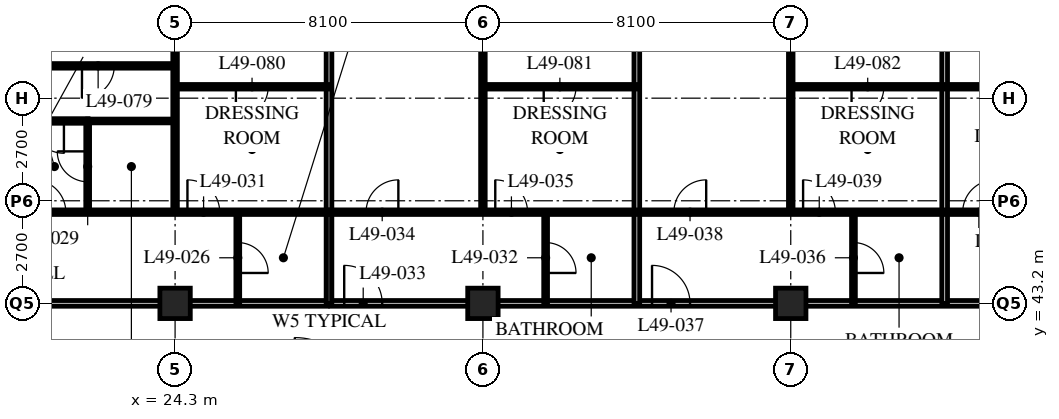
"""IFC4 building model, lengths in metres.
Left out: names, types, materials, properties, quantities, classifications, styles, units other than length and angle.
Written with IfcOpenShell. Run it as: python <this file> out.ifc"""

import sys

from ifc_helpers import new_model, si_unit, direction, frame, frame_2d, origin, origin_2d, place, context, subcontext, project, spatial, rectangle, hollow_rectangle, extrude, element, fill, save


model = new_model("IFC4")
c1 = context("Model", 3, precision=1e-05, world=origin(), true_north=direction((0.0, 1.0)))
c2 = subcontext(c1, "Body", "Model", "MODEL_VIEW")
j1 = project(units=[si_unit("LENGTHUNIT", "METRE"), si_unit("PLANEANGLEUNIT", "RADIAN")], contexts=[c1])
p1 = place(None, origin())
s1 = spatial("IfcSite", under=j1, at=p1, CompositionType="ELEMENT")
p2 = place(p1, origin())
s2 = spatial("IfcBuilding", under=s1, at=p2, CompositionType="ELEMENT")
p3 = place(p2, frame((0.0, 0.0, 192.0)))
s3 = spatial("IfcBuildingStorey", under=s2, at=p3, CompositionType="ELEMENT", Elevation=192.0)
for number, where, z_axis, x_axis in (
    (1, (24.3, 43.2, 0.0), (0.0, 0.0, 1.0), (1.0, 0.0, 0.0)),
    (2, (32.4, 43.2, 0.0), (0.0, 0.0, 1.0), (1.0, 0.0, 0.0)),
    (3, (40.5, 43.2, 0.0), (0.0, 0.0, 1.0), (1.0, 0.0, 0.0)),
):
    element("IfcColumn", number, at=place(p3, frame(where, z_axis=z_axis, x_axis=x_axis)), inside=s3, PredefinedType="COLUMN", context=c2, shape_type="SweptSolid", body=[
        extrude(hollow_rectangle(XDim=0.8, YDim=0.8, WallThickness=0.08, at=origin_2d()), origin(), (0.0, 0.0, 1.0), 3.6),
    ])
p4 = place(p3, frame((8.1, 43.2, 0.0), z_axis=(0.0, 0.0, 1.0), x_axis=(1.0, 0.0, 0.0)))
e4 = element("IfcWall", 4, at=p4, inside=s3, PredefinedType="PARTITIONING", context=c2, shape_type="SweptSolid", body=[
    extrude(rectangle(XDim=40.5, YDim=0.15, at=frame_2d((20.25, 0.0))), origin(), (0.0, 0.0, 1.0), 2.778),
])
p5 = place(p4, frame((4.45, 0.0, 0.0)))
e5 = element("IfcOpeningElement", 5, at=p5, cuts=e4, PredefinedType="OPENING", context=c2, shape_type="SweptSolid", body=[
    extrude(rectangle(XDim=1.0, YDim=2.1, at=frame_2d((0.5, 1.05))), frame((0.0, 0.085, 0.0), z_axis=(0.0, -1.0, 0.0), x_axis=(1.0, 0.0, 0.0)), (0.0, 0.0, 1.0), 0.17),
])
p6 = place(p4, frame((20.65, 0.0, 0.0)))
e6 = element("IfcOpeningElement", 6, at=p6, cuts=e4, PredefinedType="OPENING", context=c2, shape_type="SweptSolid", body=[
    extrude(rectangle(XDim=1.0, YDim=2.1, at=frame_2d((0.5, 1.05))), frame((0.0, 0.085, 0.0), z_axis=(0.0, -1.0, 0.0), x_axis=(1.0, 0.0, 0.0)), (0.0, 0.0, 1.0), 0.17),
])
p7 = place(p4, frame((28.75, 0.0, 0.0)))
e7 = element("IfcOpeningElement", 7, at=p7, cuts=e4, PredefinedType="OPENING", context=c2, shape_type="SweptSolid", body=[
    extrude(rectangle(XDim=1.0, YDim=2.1, at=frame_2d((0.5, 1.05))), frame((0.0, 0.085, 0.0), z_axis=(0.0, -1.0, 0.0), x_axis=(1.0, 0.0, 0.0)), (0.0, 0.0, 1.0), 0.17),
])
p8 = place(p4, frame((37.975, 0.0, 0.0)))
e8 = element("IfcOpeningElement", 8, at=p8, cuts=e4, PredefinedType="OPENING", context=c2, shape_type="SweptSolid", body=[
    extrude(rectangle(XDim=1.0, YDim=2.1, at=frame_2d((0.5, 1.05))), frame((0.0, 0.085, 0.0), z_axis=(0.0, -1.0, 0.0), x_axis=(1.0, 0.0, 0.0)), (0.0, 0.0, 1.0), 0.17),
])
p9 = place(p4, frame((1.525, 0.0, 0.0)))
e9 = element("IfcOpeningElement", 9, at=p9, cuts=e4, PredefinedType="OPENING", context=c2, shape_type="SweptSolid", body=[
    extrude(rectangle(XDim=1.0, YDim=2.1, at=frame_2d((0.5, 1.05))), frame((0.0, 0.085, 0.0), z_axis=(0.0, -1.0, 0.0), x_axis=(1.0, 0.0, 0.0)), (0.0, 0.0, 1.0), 0.17),
])
p10 = place(p3, frame((25.95, 43.2, 0.0), z_axis=(0.0, 0.0, 1.0), x_axis=(0.0, 1.0, 0.0)))
e10 = element("IfcWall", 10, at=p10, inside=s3, PredefinedType="PARTITIONING", context=c2, shape_type="SweptSolid", body=[
    extrude(rectangle(XDim=2.4, YDim=0.1, at=frame_2d((1.2, 0.0))), origin(), (0.0, 0.0, 1.0), 3.39),
])
p11 = place(p10, frame((0.8, 0.0, 0.0)))
e11 = element("IfcOpeningElement", 11, at=p11, cuts=e10, PredefinedType="OPENING", context=c2, shape_type="SweptSolid", body=[
    extrude(rectangle(XDim=0.8, YDim=2.1, at=frame_2d((0.4, 1.05))), frame((0.0, 0.06, 0.0), z_axis=(0.0, -1.0, 0.0), x_axis=(1.0, 0.0, 0.0)), (0.0, 0.0, 1.0), 0.12),
])
p12 = place(p3, frame((22.0, 45.6, 0.0), z_axis=(0.0, 0.0, 1.0), x_axis=(0.0, 1.0, 0.0)))
e12 = element("IfcWall", 12, at=p12, inside=s3, PredefinedType="PARTITIONING", context=c2, shape_type="SweptSolid", body=[
    extrude(rectangle(XDim=2.4, YDim=0.1, at=frame_2d((1.2, 0.0))), origin(), (0.0, 0.0, 1.0), 3.39),
])
p13 = place(p12, frame((0.8, 0.0, 0.0)))
e13 = element("IfcOpeningElement", 13, at=p13, cuts=e12, PredefinedType="OPENING", context=c2, shape_type="SweptSolid", body=[
    extrude(rectangle(XDim=0.8, YDim=2.1, at=frame_2d((0.4, 1.05))), frame((0.0, 0.06, 0.0), z_axis=(0.0, -1.0, 0.0), x_axis=(1.0, 0.0, 0.0)), (0.0, 0.0, 1.0), 0.12),
])
p14 = place(p3, frame((22.0, 48.0, 0.0), z_axis=(0.0, 0.0, 1.0), x_axis=(1.0, 0.0, 0.0)))
e14 = element("IfcWall", 14, at=p14, inside=s3, PredefinedType="PARTITIONING", context=c2, shape_type="SweptSolid", body=[
    extrude(rectangle(XDim=2.3, YDim=0.1, at=frame_2d((1.15, 0.0))), origin(), (0.0, 0.0, 1.0), 3.39),
])
p15 = place(p3, frame((24.3, 45.6, 0.0), z_axis=(0.0, 0.0, 1.0), x_axis=(0.0, 1.0, 0.0)))
e15 = element("IfcWall", 15, at=p15, inside=s3, PredefinedType="PARTITIONING", context=c2, shape_type="SweptSolid", body=[
    extrude(rectangle(XDim=13.5, YDim=0.12, at=frame_2d((6.75, 0.0))), origin(), (0.0, 0.0, 1.0), 2.778),
])
p16 = place(p3, frame((28.35, 43.2, 0.0), z_axis=(0.0, 0.0, 1.0), x_axis=(0.0, 1.0, 0.0)))
e16 = element("IfcWall", 16, at=p16, inside=s3, PredefinedType="PARTITIONING", context=c2, shape_type="SweptSolid", body=[
    extrude(rectangle(XDim=15.9, YDim=0.15, at=frame_2d((7.95, 0.0))), origin(), (0.0, 0.0, 1.0), 3.39),
])
p17 = place(p3, frame((34.05, 43.2, 0.0), z_axis=(0.0, 0.0, 1.0), x_axis=(0.0, 1.0, 0.0)))
e17 = element("IfcWall", 17, at=p17, inside=s3, PredefinedType="PARTITIONING", context=c2, shape_type="SweptSolid", body=[
    extrude(rectangle(XDim=2.4, YDim=0.1, at=frame_2d((1.2, 0.0))), origin(), (0.0, 0.0, 1.0), 3.39),
])
p18 = place(p17, frame((0.8, 0.0, 0.0)))
e18 = element("IfcOpeningElement", 18, at=p18, cuts=e17, PredefinedType="OPENING", context=c2, shape_type="SweptSolid", body=[
    extrude(rectangle(XDim=0.8, YDim=2.1, at=frame_2d((0.4, 1.05))), frame((0.0, 0.06, 0.0), z_axis=(0.0, -1.0, 0.0), x_axis=(1.0, 0.0, 0.0)), (0.0, 0.0, 1.0), 0.12),
])
p19 = place(p3, frame((32.4, 45.6, 0.0), z_axis=(0.0, 0.0, 1.0), x_axis=(0.0, 1.0, 0.0)))
e19 = element("IfcWall", 19, at=p19, inside=s3, PredefinedType="PARTITIONING", context=c2, shape_type="SweptSolid", body=[
    extrude(rectangle(XDim=13.5, YDim=0.12, at=frame_2d((6.75, 0.0))), origin(), (0.0, 0.0, 1.0), 2.778),
])
p20 = place(p3, frame((36.45, 43.2, 0.0), z_axis=(0.0, 0.0, 1.0), x_axis=(0.0, 1.0, 0.0)))
e20 = element("IfcWall", 20, at=p20, inside=s3, PredefinedType="PARTITIONING", context=c2, shape_type="SweptSolid", body=[
    extrude(rectangle(XDim=15.9, YDim=0.15, at=frame_2d((7.95, 0.0))), origin(), (0.0, 0.0, 1.0), 3.39),
])
p21 = place(p3, frame((42.15, 43.2, 0.0), z_axis=(0.0, 0.0, 1.0), x_axis=(0.0, 1.0, 0.0)))
e21 = element("IfcWall", 21, at=p21, inside=s3, PredefinedType="PARTITIONING", context=c2, shape_type="SweptSolid", body=[
    extrude(rectangle(XDim=2.4, YDim=0.1, at=frame_2d((1.2, 0.0))), origin(), (0.0, 0.0, 1.0), 3.39),
])
p22 = place(p21, frame((0.8, 0.0, 0.0)))
e22 = element("IfcOpeningElement", 22, at=p22, cuts=e21, PredefinedType="OPENING", context=c2, shape_type="SweptSolid", body=[
    extrude(rectangle(XDim=0.8, YDim=2.1, at=frame_2d((0.4, 1.05))), frame((0.0, 0.06, 0.0), z_axis=(0.0, -1.0, 0.0), x_axis=(1.0, 0.0, 0.0)), (0.0, 0.0, 1.0), 0.12),
])
p23 = place(p3, frame((40.5, 45.6, 0.0), z_axis=(0.0, 0.0, 1.0), x_axis=(0.0, 1.0, 0.0)))
e23 = element("IfcWall", 23, at=p23, inside=s3, PredefinedType="PARTITIONING", context=c2, shape_type="SweptSolid", body=[
    extrude(rectangle(XDim=13.5, YDim=0.12, at=frame_2d((6.75, 0.0))), origin(), (0.0, 0.0, 1.0), 2.778),
])
p24 = place(p3, frame((44.55, 43.2, 0.0), z_axis=(0.0, 0.0, 1.0), x_axis=(0.0, 1.0, 0.0)))
e24 = element("IfcWall", 24, at=p24, inside=s3, PredefinedType="PARTITIONING", context=c2, shape_type="SweptSolid", body=[
    extrude(rectangle(XDim=15.9, YDim=0.15, at=frame_2d((7.95, 0.0))), origin(), (0.0, 0.0, 1.0), 3.39),
])
p25 = place(p3, frame((4.1, 45.6, 0.0), z_axis=(0.0, 0.0, 1.0), x_axis=(1.0, 0.0, 0.0)))
e25 = element("IfcWall", 25, at=p25, inside=s3, PredefinedType="PARTITIONING", context=c2, shape_type="SweptSolid", body=[
    extrude(rectangle(XDim=48.5, YDim=0.12, at=frame_2d((24.25, 0.0))), origin(), (0.0, 0.0, 1.0), 3.39),
])
p26 = place(p25, frame((9.025, 0.0, 0.0)))
e26 = element("IfcOpeningElement", 26, at=p26, cuts=e25, PredefinedType="OPENING", context=c2, shape_type="SweptSolid", body=[
    extrude(rectangle(XDim=0.85, YDim=2.1, at=frame_2d((0.425, 1.05))), frame((0.0, 0.07, 0.0), z_axis=(0.0, -1.0, 0.0), x_axis=(1.0, 0.0, 0.0)), (0.0, 0.0, 1.0), 0.14),
])
p27 = place(p25, frame((16.475, 0.0, 0.0)))
e27 = element("IfcOpeningElement", 27, at=p27, cuts=e25, PredefinedType="OPENING", context=c2, shape_type="SweptSolid", body=[
    extrude(rectangle(XDim=0.85, YDim=2.1, at=frame_2d((0.425, 1.05))), frame((0.0, 0.07, 0.0), z_axis=(0.0, -1.0, 0.0), x_axis=(1.0, 0.0, 0.0)), (0.0, 0.0, 1.0), 0.14),
])
p28 = place(p25, frame((20.525, 0.0, 0.0)))
e28 = element("IfcOpeningElement", 28, at=p28, cuts=e25, PredefinedType="OPENING", context=c2, shape_type="SweptSolid", body=[
    extrude(rectangle(XDim=0.85, YDim=2.1, at=frame_2d((0.425, 1.05))), frame((0.0, 0.07, 0.0), z_axis=(0.0, -1.0, 0.0), x_axis=(1.0, 0.0, 0.0)), (0.0, 0.0, 1.0), 0.14),
])
p29 = place(p25, frame((25.225, 0.0, 0.0)))
e29 = element("IfcOpeningElement", 29, at=p29, cuts=e25, PredefinedType="OPENING", context=c2, shape_type="SweptSolid", body=[
    extrude(rectangle(XDim=0.85, YDim=2.1, at=frame_2d((0.425, 1.05))), frame((0.0, 0.07, 0.0), z_axis=(0.0, -1.0, 0.0), x_axis=(1.0, 0.0, 0.0)), (0.0, 0.0, 1.0), 0.14),
])
p30 = place(p25, frame((28.625, 0.0, 0.0)))
e30 = element("IfcOpeningElement", 30, at=p30, cuts=e25, PredefinedType="OPENING", context=c2, shape_type="SweptSolid", body=[
    extrude(rectangle(XDim=0.85, YDim=2.1, at=frame_2d((0.425, 1.05))), frame((0.0, 0.07, 0.0), z_axis=(0.0, -1.0, 0.0), x_axis=(1.0, 0.0, 0.0)), (0.0, 0.0, 1.0), 0.14),
])
p31 = place(p25, frame((33.325, 0.0, 0.0)))
e31 = element("IfcOpeningElement", 31, at=p31, cuts=e25, PredefinedType="OPENING", context=c2, shape_type="SweptSolid", body=[
    extrude(rectangle(XDim=0.85, YDim=2.1, at=frame_2d((0.425, 1.05))), frame((0.0, 0.07, 0.0), z_axis=(0.0, -1.0, 0.0), x_axis=(1.0, 0.0, 0.0)), (0.0, 0.0, 1.0), 0.14),
])
p32 = place(p25, frame((36.725, 0.0, 0.0)))
e32 = element("IfcOpeningElement", 32, at=p32, cuts=e25, PredefinedType="OPENING", context=c2, shape_type="SweptSolid", body=[
    extrude(rectangle(XDim=0.85, YDim=2.1, at=frame_2d((0.425, 1.05))), frame((0.0, 0.07, 0.0), z_axis=(0.0, -1.0, 0.0), x_axis=(1.0, 0.0, 0.0)), (0.0, 0.0, 1.0), 0.14),
])
p33 = place(p25, frame((40.925, 0.0, 0.0)))
e33 = element("IfcOpeningElement", 33, at=p33, cuts=e25, PredefinedType="OPENING", context=c2, shape_type="SweptSolid", body=[
    extrude(rectangle(XDim=0.85, YDim=2.1, at=frame_2d((0.425, 1.05))), frame((0.0, 0.07, 0.0), z_axis=(0.0, -1.0, 0.0), x_axis=(1.0, 0.0, 0.0)), (0.0, 0.0, 1.0), 0.14),
])
p34 = place(p25, frame((44.775, 0.0, 0.0)))
e34 = element("IfcOpeningElement", 34, at=p34, cuts=e25, PredefinedType="OPENING", context=c2, shape_type="SweptSolid", body=[
    extrude(rectangle(XDim=0.85, YDim=2.1, at=frame_2d((0.425, 1.05))), frame((0.0, 0.07, 0.0), z_axis=(0.0, -1.0, 0.0), x_axis=(1.0, 0.0, 0.0)), (0.0, 0.0, 1.0), 0.14),
])
p35 = place(p25, frame((6.725, 0.0, 0.0)))
e35 = element("IfcOpeningElement", 35, at=p35, cuts=e25, PredefinedType="OPENING", context=c2, shape_type="SweptSolid", body=[
    extrude(rectangle(XDim=0.85, YDim=2.1, at=frame_2d((0.425, 1.05))), frame((0.0, 0.07, 0.0), z_axis=(0.0, -1.0, 0.0), x_axis=(1.0, 0.0, 0.0)), (0.0, 0.0, 1.0), 0.14),
])
p36 = place(p25, frame((2.875, 0.0, 0.0)))
e36 = element("IfcOpeningElement", 36, at=p36, cuts=e25, PredefinedType="OPENING", context=c2, shape_type="SweptSolid", body=[
    extrude(rectangle(XDim=0.85, YDim=2.1, at=frame_2d((0.425, 1.05))), frame((0.0, 0.07, 0.0), z_axis=(0.0, -1.0, 0.0), x_axis=(1.0, 0.0, 0.0)), (0.0, 0.0, 1.0), 0.14),
])
p37 = place(p3, frame((20.25, 48.0, 0.0), z_axis=(0.0, 0.0, 1.0), x_axis=(1.0, 0.0, 0.0)))
e37 = element("IfcWall", 37, at=p37, inside=s3, PredefinedType="PARTITIONING", context=c2, shape_type="SweptSolid", body=[
    extrude(rectangle(XDim=1.76, YDim=0.12, at=frame_2d((0.88, 0.0))), origin(), (0.0, 0.0, 1.0), 3.39),
])
p38 = place(p37, frame((0.275, 0.0, 0.0)))
e38 = element("IfcOpeningElement", 38, at=p38, cuts=e37, PredefinedType="OPENING", context=c2, shape_type="SweptSolid", body=[
    extrude(rectangle(XDim=0.85, YDim=2.1, at=frame_2d((0.425, 1.05))), frame((0.0, 0.07, 0.0), z_axis=(0.0, -1.0, 0.0), x_axis=(1.0, 0.0, 0.0)), (0.0, 0.0, 1.0), 0.14),
])
p39 = place(p3, frame((20.25, 49.45, 0.0), z_axis=(0.0, 0.0, 1.0), x_axis=(1.0, 0.0, 0.0)))
e39 = element("IfcWall", 39, at=p39, inside=s3, PredefinedType="PARTITIONING", context=c2, shape_type="SweptSolid", body=[
    extrude(rectangle(XDim=4.05, YDim=0.12, at=frame_2d((2.025, 0.0))), origin(), (0.0, 0.0, 1.0), 3.39),
])
p40 = place(p39, frame((1.6, 0.0, 0.0)))
e40 = element("IfcOpeningElement", 40, at=p40, cuts=e39, PredefinedType="OPENING", context=c2, shape_type="SweptSolid", body=[
    extrude(rectangle(XDim=0.85, YDim=2.1, at=frame_2d((0.425, 1.05))), frame((0.0, 0.07, 0.0), z_axis=(0.0, -1.0, 0.0), x_axis=(1.0, 0.0, 0.0)), (0.0, 0.0, 1.0), 0.14),
])
p41 = place(p3, frame((24.3, 48.9, 0.0), z_axis=(0.0, 0.0, 1.0), x_axis=(1.0, 0.0, 0.0)))
e41 = element("IfcWall", 41, at=p41, inside=s3, PredefinedType="PARTITIONING", context=c2, shape_type="SweptSolid", body=[
    extrude(rectangle(XDim=4.05, YDim=0.12, at=frame_2d((2.025, 0.0))), origin(), (0.0, 0.0, 1.0), 3.39),
])
p42 = place(p41, frame((1.6, 0.0, 0.0)))
e42 = element("IfcOpeningElement", 42, at=p42, cuts=e41, PredefinedType="OPENING", context=c2, shape_type="SweptSolid", body=[
    extrude(rectangle(XDim=0.85, YDim=2.1, at=frame_2d((0.425, 1.05))), frame((0.0, 0.07, 0.0), z_axis=(0.0, -1.0, 0.0), x_axis=(1.0, 0.0, 0.0)), (0.0, 0.0, 1.0), 0.14),
])
p43 = place(p3, frame((32.4, 48.9, 0.0), z_axis=(0.0, 0.0, 1.0), x_axis=(1.0, 0.0, 0.0)))
e43 = element("IfcWall", 43, at=p43, inside=s3, PredefinedType="PARTITIONING", context=c2, shape_type="SweptSolid", body=[
    extrude(rectangle(XDim=4.05, YDim=0.12, at=frame_2d((2.025, 0.0))), origin(), (0.0, 0.0, 1.0), 3.39),
])
p44 = place(p43, frame((1.6, 0.0, 0.0)))
e44 = element("IfcOpeningElement", 44, at=p44, cuts=e43, PredefinedType="OPENING", context=c2, shape_type="SweptSolid", body=[
    extrude(rectangle(XDim=0.85, YDim=2.1, at=frame_2d((0.425, 1.05))), frame((0.0, 0.07, 0.0), z_axis=(0.0, -1.0, 0.0), x_axis=(1.0, 0.0, 0.0)), (0.0, 0.0, 1.0), 0.14),
])
p45 = place(p3, frame((40.5, 48.9, 0.0), z_axis=(0.0, 0.0, 1.0), x_axis=(1.0, 0.0, 0.0)))
e45 = element("IfcWall", 45, at=p45, inside=s3, PredefinedType="PARTITIONING", context=c2, shape_type="SweptSolid", body=[
    extrude(rectangle(XDim=8.1, YDim=0.12, at=frame_2d((4.05, 0.0))), origin(), (0.0, 0.0, 1.0), 3.39),
])
p46 = place(p45, frame((1.6, 0.0, 0.0)))
e46 = element("IfcOpeningElement", 46, at=p46, cuts=e45, PredefinedType="OPENING", context=c2, shape_type="SweptSolid", body=[
    extrude(rectangle(XDim=0.85, YDim=2.1, at=frame_2d((0.425, 1.05))), frame((0.0, 0.07, 0.0), z_axis=(0.0, -1.0, 0.0), x_axis=(1.0, 0.0, 0.0)), (0.0, 0.0, 1.0), 0.14),
])
p47 = place(p45, frame((5.65, 0.0, 0.0)))
e47 = element("IfcOpeningElement", 47, at=p47, cuts=e45, PredefinedType="OPENING", context=c2, shape_type="SweptSolid", body=[
    extrude(rectangle(XDim=0.85, YDim=2.1, at=frame_2d((0.425, 1.05))), frame((0.0, 0.07, 0.0), z_axis=(0.0, -1.0, 0.0), x_axis=(1.0, 0.0, 0.0)), (0.0, 0.0, 1.0), 0.14),
])
p48 = place(p11, origin())
e48 = element("IfcDoor", 48, at=p48, inside=s3, OperationType="SINGLE_SWING_RIGHT", PredefinedType="DOOR", context=c2, shape_type="SweptSolid", body=[
    extrude(rectangle(XDim=0.8, YDim=2.1, at=frame_2d((0.4, 1.05))), frame((0.0, 0.025, 0.0), z_axis=(0.0, -1.0, 0.0), x_axis=(1.0, 0.0, 0.0)), (0.0, 0.0, 1.0), 0.05),
])
fill(e11, e48)
p49 = place(p13, origin())
e49 = element("IfcDoor", 49, at=p49, inside=s3, OperationType="SINGLE_SWING_RIGHT", PredefinedType="DOOR", context=c2, shape_type="SweptSolid", body=[
    extrude(rectangle(XDim=0.8, YDim=2.1, at=frame_2d((0.4, 1.05))), frame((0.0, 0.025, 0.0), z_axis=(0.0, -1.0, 0.0), x_axis=(1.0, 0.0, 0.0)), (0.0, 0.0, 1.0), 0.05),
])
fill(e13, e49)
p50 = place(p27, origin())
e50 = element("IfcDoor", 50, at=p50, inside=s3, OperationType="SINGLE_SWING_LEFT", PredefinedType="DOOR", context=c2, shape_type="SweptSolid", body=[
    extrude(rectangle(XDim=0.85, YDim=2.1, at=frame_2d((0.425, 1.05))), frame((0.0, 0.025, 0.0), z_axis=(0.0, -1.0, 0.0), x_axis=(1.0, 0.0, 0.0)), (0.0, 0.0, 1.0), 0.05),
])
fill(e27, e50)
p51 = place(p28, origin())
e51 = element("IfcDoor", 51, at=p51, inside=s3, OperationType="SINGLE_SWING_LEFT", PredefinedType="DOOR", context=c2, shape_type="SweptSolid", body=[
    extrude(rectangle(XDim=0.85, YDim=2.1, at=frame_2d((0.425, 1.05))), frame((0.0, 0.025, 0.0), z_axis=(0.0, -1.0, 0.0), x_axis=(1.0, 0.0, 0.0)), (0.0, 0.0, 1.0), 0.05),
])
fill(e28, e51)
p52 = place(p18, origin())
e52 = element("IfcDoor", 52, at=p52, inside=s3, OperationType="SINGLE_SWING_RIGHT", PredefinedType="DOOR", context=c2, shape_type="SweptSolid", body=[
    extrude(rectangle(XDim=0.8, YDim=2.1, at=frame_2d((0.4, 1.05))), frame((0.0, 0.025, 0.0), z_axis=(0.0, -1.0, 0.0), x_axis=(1.0, 0.0, 0.0)), (0.0, 0.0, 1.0), 0.05),
])
fill(e18, e52)
p53 = place(p6, origin())
e53 = element("IfcDoor", 53, at=p53, inside=s3, OperationType="SINGLE_SWING_LEFT", PredefinedType="DOOR", context=c2, shape_type="SweptSolid", body=[
    extrude(rectangle(XDim=1.0, YDim=2.1, at=frame_2d((0.5, 1.05))), frame((0.0, 0.025, 0.0), z_axis=(0.0, -1.0, 0.0), x_axis=(1.0, 0.0, 0.0)), (0.0, 0.0, 1.0), 0.05),
])
fill(e6, e53)
p54 = place(p29, origin())
e54 = element("IfcDoor", 54, at=p54, inside=s3, OperationType="SINGLE_SWING_RIGHT", PredefinedType="DOOR", context=c2, shape_type="SweptSolid", body=[
    extrude(rectangle(XDim=0.85, YDim=2.1, at=frame_2d((0.425, 1.05))), frame((0.0, 0.025, 0.0), z_axis=(0.0, -1.0, 0.0), x_axis=(1.0, 0.0, 0.0)), (0.0, 0.0, 1.0), 0.05),
])
fill(e29, e54)
p55 = place(p30, origin())
e55 = element("IfcDoor", 55, at=p55, inside=s3, OperationType="SINGLE_SWING_LEFT", PredefinedType="DOOR", context=c2, shape_type="SweptSolid", body=[
    extrude(rectangle(XDim=0.85, YDim=2.1, at=frame_2d((0.425, 1.05))), frame((0.0, 0.025, 0.0), z_axis=(0.0, -1.0, 0.0), x_axis=(1.0, 0.0, 0.0)), (0.0, 0.0, 1.0), 0.05),
])
fill(e30, e55)
p56 = place(p22, origin())
e56 = element("IfcDoor", 56, at=p56, inside=s3, OperationType="SINGLE_SWING_RIGHT", PredefinedType="DOOR", context=c2, shape_type="SweptSolid", body=[
    extrude(rectangle(XDim=0.8, YDim=2.1, at=frame_2d((0.4, 1.05))), frame((0.0, 0.025, 0.0), z_axis=(0.0, -1.0, 0.0), x_axis=(1.0, 0.0, 0.0)), (0.0, 0.0, 1.0), 0.05),
])
fill(e22, e56)
p57 = place(p7, origin())
e57 = element("IfcDoor", 57, at=p57, inside=s3, OperationType="SINGLE_SWING_LEFT", PredefinedType="DOOR", context=c2, shape_type="SweptSolid", body=[
    extrude(rectangle(XDim=1.0, YDim=2.1, at=frame_2d((0.5, 1.05))), frame((0.0, 0.025, 0.0), z_axis=(0.0, -1.0, 0.0), x_axis=(1.0, 0.0, 0.0)), (0.0, 0.0, 1.0), 0.05),
])
fill(e7, e57)
p58 = place(p31, origin())
e58 = element("IfcDoor", 58, at=p58, inside=s3, OperationType="SINGLE_SWING_RIGHT", PredefinedType="DOOR", context=c2, shape_type="SweptSolid", body=[
    extrude(rectangle(XDim=0.85, YDim=2.1, at=frame_2d((0.425, 1.05))), frame((0.0, 0.025, 0.0), z_axis=(0.0, -1.0, 0.0), x_axis=(1.0, 0.0, 0.0)), (0.0, 0.0, 1.0), 0.05),
])
fill(e31, e58)
p59 = place(p32, origin())
e59 = element("IfcDoor", 59, at=p59, inside=s3, OperationType="SINGLE_SWING_LEFT", PredefinedType="DOOR", context=c2, shape_type="SweptSolid", body=[
    extrude(rectangle(XDim=0.85, YDim=2.1, at=frame_2d((0.425, 1.05))), frame((0.0, 0.025, 0.0), z_axis=(0.0, -1.0, 0.0), x_axis=(1.0, 0.0, 0.0)), (0.0, 0.0, 1.0), 0.05),
])
fill(e32, e59)
p60 = place(p33, origin())
e60 = element("IfcDoor", 60, at=p60, inside=s3, OperationType="SINGLE_SWING_RIGHT", PredefinedType="DOOR", context=c2, shape_type="SweptSolid", body=[
    extrude(rectangle(XDim=0.85, YDim=2.1, at=frame_2d((0.425, 1.05))), frame((0.0, 0.025, 0.0), z_axis=(0.0, -1.0, 0.0), x_axis=(1.0, 0.0, 0.0)), (0.0, 0.0, 1.0), 0.05),
])
fill(e33, e60)
p61 = place(p38, origin())
e61 = element("IfcDoor", 61, at=p61, inside=s3, OperationType="SINGLE_SWING_LEFT", PredefinedType="DOOR", context=c2, shape_type="SweptSolid", body=[
    extrude(rectangle(XDim=0.85, YDim=2.1, at=frame_2d((0.425, 1.05))), frame((0.0, 0.025, 0.0), z_axis=(0.0, -1.0, 0.0), x_axis=(1.0, 0.0, 0.0)), (0.0, 0.0, 1.0), 0.05),
])
fill(e38, e61)
p62 = place(p40, origin())
e62 = element("IfcDoor", 62, at=p62, inside=s3, OperationType="SINGLE_SWING_RIGHT", PredefinedType="DOOR", context=c2, shape_type="SweptSolid", body=[
    extrude(rectangle(XDim=0.85, YDim=2.1, at=frame_2d((0.425, 1.05))), frame((0.0, 0.025, 0.0), z_axis=(0.0, -1.0, 0.0), x_axis=(1.0, 0.0, 0.0)), (0.0, 0.0, 1.0), 0.05),
])
fill(e40, e62)
p63 = place(p42, origin())
e63 = element("IfcDoor", 63, at=p63, inside=s3, OperationType="SINGLE_SWING_RIGHT", PredefinedType="DOOR", context=c2, shape_type="SweptSolid", body=[
    extrude(rectangle(XDim=0.85, YDim=2.1, at=frame_2d((0.425, 1.05))), frame((0.0, 0.025, 0.0), z_axis=(0.0, -1.0, 0.0), x_axis=(1.0, 0.0, 0.0)), (0.0, 0.0, 1.0), 0.05),
])
fill(e42, e63)
p64 = place(p44, origin())
e64 = element("IfcDoor", 64, at=p64, inside=s3, OperationType="SINGLE_SWING_RIGHT", PredefinedType="DOOR", context=c2, shape_type="SweptSolid", body=[
    extrude(rectangle(XDim=0.85, YDim=2.1, at=frame_2d((0.425, 1.05))), frame((0.0, 0.025, 0.0), z_axis=(0.0, -1.0, 0.0), x_axis=(1.0, 0.0, 0.0)), (0.0, 0.0, 1.0), 0.05),
])
fill(e44, e64)
p65 = place(p46, origin())
e65 = element("IfcDoor", 65, at=p65, inside=s3, OperationType="SINGLE_SWING_RIGHT", PredefinedType="DOOR", context=c2, shape_type="SweptSolid", body=[
    extrude(rectangle(XDim=0.85, YDim=2.1, at=frame_2d((0.425, 1.05))), frame((0.0, 0.025, 0.0), z_axis=(0.0, -1.0, 0.0), x_axis=(1.0, 0.0, 0.0)), (0.0, 0.0, 1.0), 0.05),
])
fill(e46, e65)
save(model, sys.argv[1])
